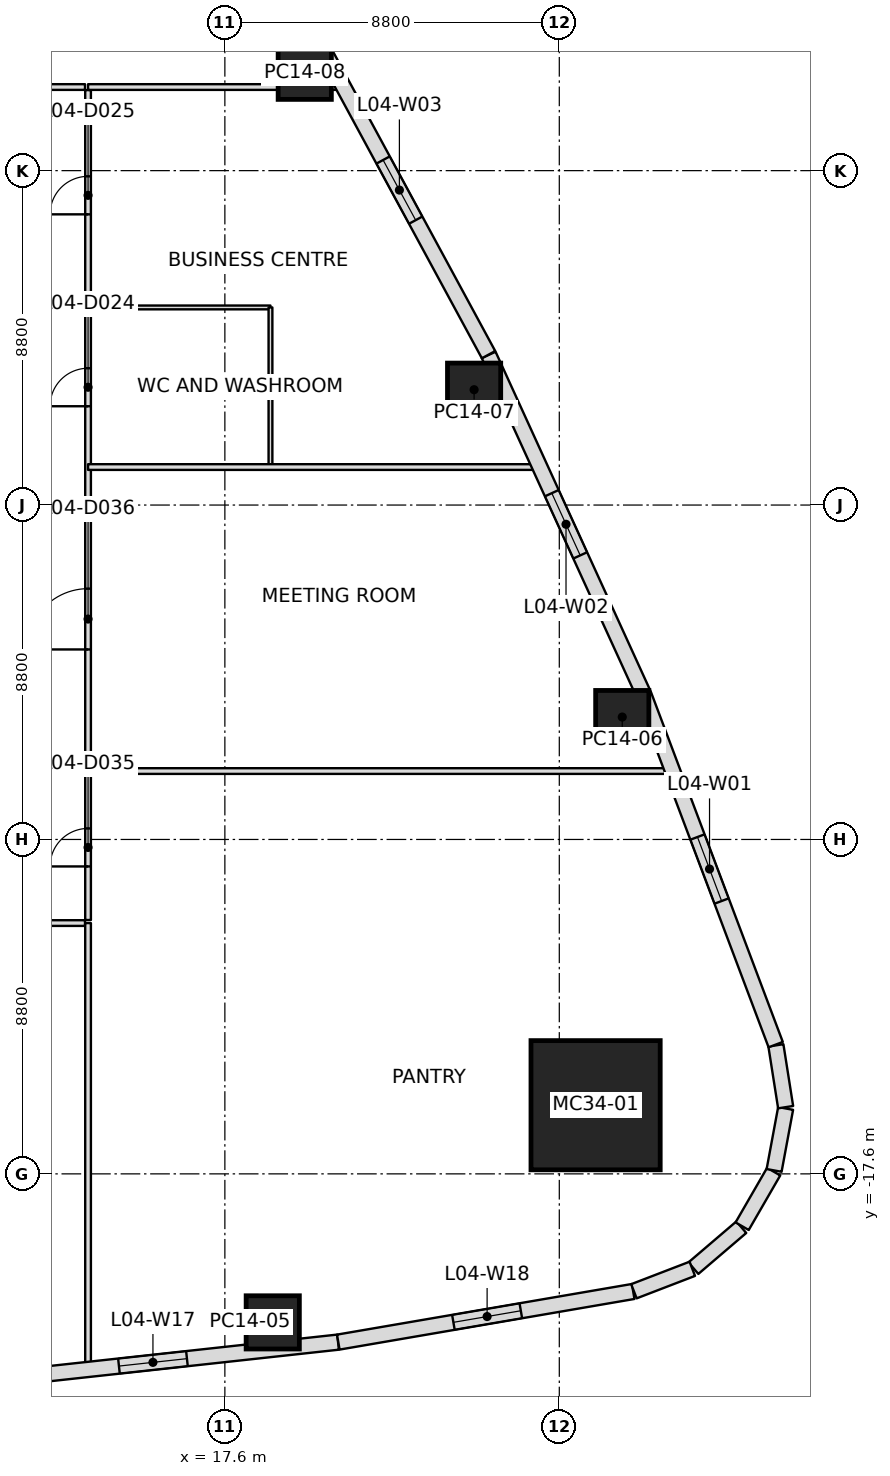
"""IFC4 building model, lengths in metres.
Left out: names, types, materials, properties, quantities, classifications, styles, units other than length and angle.
Written with IfcOpenShell. Run it as: python <this file> out.ifc"""

import sys

from ifc_helpers import new_model, si_unit, direction, frame, frame_2d, origin, origin_2d, place, context, subcontext, project, spatial, rectangle, extrude, clip, halfspace, element, fill, save


model = new_model("IFC4")
c1 = context("Model", 3, precision=1e-05, world=origin(), true_north=direction((0.0, 1.0)))
c2 = subcontext(c1, "Body", "Model", "MODEL_VIEW")
j1 = project(units=[si_unit("LENGTHUNIT", "METRE"), si_unit("PLANEANGLEUNIT", "RADIAN")], contexts=[c1])
p1 = place(None, origin())
s1 = spatial("IfcSite", under=j1, at=p1, CompositionType="ELEMENT")
p2 = place(p1, origin())
s2 = spatial("IfcBuilding", under=s1, at=p2, CompositionType="ELEMENT")
p3 = place(p2, frame((0.0, 0.0, 28.8)))
s3 = spatial("IfcBuildingStorey", under=s2, at=p3, CompositionType="ELEMENT", Elevation=28.8)
p4 = place(p3, frame((27.355, -15.793, 0.0), z_axis=(0.0, 0.0, 1.0), x_axis=(1.0, 0.0, 0.0)))
e1 = element("IfcColumn", 1, at=p4, inside=s3, PredefinedType="COLUMN", context=c2, shape_type="SweptSolid", body=[
    extrude(rectangle(XDim=3.4, YDim=3.4, at=origin_2d()), origin(), (0.0, 0.0, 1.0), 5.4),
])
p5 = place(p3, frame((18.86, -21.508, 0.0), z_axis=(0.0, 0.0, 1.0), x_axis=(0.991367231014, 0.131114504428, 0.0)))
e2 = element("IfcColumn", 2, at=p5, inside=s3, PredefinedType="COLUMN", context=c2, shape_type="SweptSolid", body=[
    extrude(rectangle(XDim=1.4, YDim=1.4, at=origin_2d()), origin(), (0.0, 0.0, 1.0), 5.4),
])
for number, where, z_axis, x_axis in (
    (3, (28.057, -5.579, 0.0), (0.0, 0.0, 1.0), (-0.382, 0.924, 0.0)),
    (4, (24.158, 3.035, 0.0), (0.0, 0.0, 1.0), (-0.442, 0.897, 0.0)),
    (5, (19.702, 11.375, 0.0), (0.0, 0.0, 1.0), (-0.5, 0.866, 0.0)),
):
    element("IfcColumn", number, at=place(p3, frame(where, z_axis=z_axis, x_axis=x_axis)), inside=s3, PredefinedType="COLUMN", context=c2, shape_type="SweptSolid", body=[
        clip(extrude(rectangle(XDim=1.4, YDim=1.4, at=origin_2d()), origin(), (0.0, 0.0, 1.0), 5.4), halfspace(frame((0.0, 0.0, 5.394)), False)),
    ])
for number, where, z_axis, x_axis in (
    (6, (31.19, -19.003, 0.0), (0.0, 0.0, 1.0), (-0.76, -0.65, 0.0)),
    (7, (32.041, -17.541, 0.0), (0.0, 0.0, 1.0), (-0.5, -0.866, 0.0)),
    (8, (32.355, -15.878, 0.0), (0.0, 0.0, 1.0), (-0.183, -0.983, 0.0)),
):
    element("IfcWall", number, at=place(p3, frame(where, z_axis=z_axis, x_axis=x_axis)), inside=s3, PredefinedType="STANDARD", context=c2, shape_type="SweptSolid", body=[
        extrude(rectangle(XDim=1.659, YDim=0.4, at=frame_2d((0.829, 0.0))), origin(), (0.0, 0.0, 1.0), 4.5),
    ])
p6 = place(p3, frame((32.099, -14.219, 0.0), z_axis=(0.0, 0.0, 1.0), x_axis=(0.155711266073, -0.98780261268, 0.0)))
e9 = element("IfcWall", 9, at=p6, inside=s3, PredefinedType="STANDARD", context=c2, shape_type="SweptSolid", body=[
    extrude(rectangle(XDim=1.646, YDim=0.4, at=frame_2d((0.823, 0.0))), origin(), (0.0, 0.0, 1.0), 4.5),
])
p7 = place(p3, frame((28.625, -4.993, 0.0), z_axis=(0.0, 0.0, 1.0), x_axis=(0.352569865932, -0.935785493389, 0.0)))
e10 = element("IfcWall", 10, at=p7, inside=s3, PredefinedType="STANDARD", context=c2, shape_type="SweptSolid", body=[
    extrude(rectangle(XDim=9.838, YDim=0.4, at=frame_2d((4.919, 0.0))), origin(), (0.0, 0.0, 1.0), 4.5),
])
p8 = place(p7, frame((4.0, 0.0, 0.9)))
e11 = element("IfcOpeningElement", 11, at=p8, cuts=e10, PredefinedType="OPENING", context=c2, shape_type="SweptSolid", body=[
    extrude(rectangle(XDim=1.8, YDim=1.5, at=frame_2d((0.9, 0.75))), frame((0.0, 0.2, 0.0), z_axis=(0.0, -1.0, 0.0), x_axis=(1.0, 0.0, 0.0)), (0.0, 0.0, 1.0), 0.4),
])
p9 = place(p3, frame((24.541, 3.951, 0.0), z_axis=(0.0, 0.0, 1.0), x_axis=(0.415399179946, -0.909639225902, 0.0)))
e12 = element("IfcWall", 12, at=p9, inside=s3, PredefinedType="STANDARD", context=c2, shape_type="SweptSolid", body=[
    extrude(rectangle(XDim=9.826, YDim=0.4, at=frame_2d((4.913, 0.0))), origin(), (0.0, 0.0, 1.0), 4.5),
])
p10 = place(p9, frame((4.0, 0.0, 0.9)))
e13 = element("IfcOpeningElement", 13, at=p10, cuts=e12, PredefinedType="OPENING", context=c2, shape_type="SweptSolid", body=[
    extrude(rectangle(XDim=1.8, YDim=1.5, at=frame_2d((0.9, 0.75))), frame((0.0, 0.2, 0.0), z_axis=(0.0, -1.0, 0.0), x_axis=(1.0, 0.0, 0.0)), (0.0, 0.0, 1.0), 0.4),
])
p11 = place(p3, frame((19.859, 12.597, 0.0), z_axis=(0.0, 0.0, 1.0), x_axis=(0.476254331716, -0.879307575039, 0.0)))
e14 = element("IfcWall", 14, at=p11, inside=s3, PredefinedType="STANDARD", context=c2, shape_type="SweptSolid", body=[
    extrude(rectangle(XDim=9.825, YDim=0.4, at=frame_2d((4.913, 0.0))), origin(), (0.0, 0.0, 1.0), 4.5),
])
p12 = place(p11, frame((4.0, 0.0, 0.9)))
e15 = element("IfcOpeningElement", 15, at=p12, cuts=e14, PredefinedType="OPENING", context=c2, shape_type="SweptSolid", body=[
    extrude(rectangle(XDim=1.8, YDim=1.5, at=frame_2d((0.9, 0.75))), frame((0.0, 0.2, 0.0), z_axis=(0.0, -1.0, 0.0), x_axis=(1.0, 0.0, 0.0)), (0.0, 0.0, 1.0), 0.4),
])
p13 = place(p3, frame((20.579, -22.028, 0.0), z_axis=(0.0, 0.0, 1.0), x_axis=(-0.994084776508, -0.108606892574, 0.0)))
e16 = element("IfcWall", 16, at=p13, inside=s3, PredefinedType="STANDARD", context=c2, shape_type="SweptSolid", body=[
    extrude(rectangle(XDim=9.826, YDim=0.4, at=frame_2d((4.913, 0.0))), origin(), (0.0, 0.0, 1.0), 4.5),
])
p14 = place(p13, frame((4.0, 0.0, 0.9)))
e17 = element("IfcOpeningElement", 17, at=p14, cuts=e16, PredefinedType="OPENING", context=c2, shape_type="SweptSolid", body=[
    extrude(rectangle(XDim=1.8, YDim=1.5, at=frame_2d((0.9, 0.75))), frame((0.0, 0.2, 0.0), z_axis=(0.0, -1.0, 0.0), x_axis=(1.0, 0.0, 0.0)), (0.0, 0.0, 1.0), 0.4),
])
p15 = place(p3, frame((28.344, -20.695, 0.0), z_axis=(0.0, 0.0, 1.0), x_axis=(-0.985573227811, -0.169249557228, 0.0)))
e18 = element("IfcWall", 18, at=p15, inside=s3, PredefinedType="STANDARD", context=c2, shape_type="SweptSolid", body=[
    extrude(rectangle(XDim=7.873, YDim=0.4, at=frame_2d((3.937, 0.0))), origin(), (0.0, 0.0, 1.0), 4.5),
])
p16 = place(p15, frame((3.0, 0.0, 0.9)))
e19 = element("IfcOpeningElement", 19, at=p16, cuts=e18, PredefinedType="OPENING", context=c2, shape_type="SweptSolid", body=[
    extrude(rectangle(XDim=1.8, YDim=1.5, at=frame_2d((0.9, 0.75))), frame((0.0, 0.2, 0.0), z_axis=(0.0, -1.0, 0.0), x_axis=(1.0, 0.0, 0.0)), (0.0, 0.0, 1.0), 0.4),
])
p17 = place(p3, frame((29.9, -20.098, 0.0), z_axis=(0.0, 0.0, 1.0), x_axis=(-0.933315023429, -0.359058584415, 0.0)))
e20 = element("IfcWall", 20, at=p17, inside=s3, PredefinedType="STANDARD", context=c2, shape_type="SweptSolid", body=[
    extrude(rectangle(XDim=1.646, YDim=0.4, at=frame_2d((0.823, 0.0))), origin(), (0.0, 0.0, 1.0), 4.5),
])
p18 = place(p3, frame((14.0, -11.0, 0.0), z_axis=(0.0, 0.0, 1.0), x_axis=(0.0, -1.0, 0.0)))
e21 = element("IfcWall", 21, at=p18, inside=s3, PredefinedType="PARTITIONING", context=c2, shape_type="SweptSolid", body=[
    extrude(rectangle(XDim=11.697, YDim=0.15, at=frame_2d((5.849, 0.0))), origin(), (0.0, 0.0, 1.0), 4.384),
])
p19 = place(p3, frame((14.0, -7.0, 0.0), z_axis=(0.0, 0.0, 1.0), x_axis=(1.0, 0.0, 0.0)))
e22 = element("IfcWall", 22, at=p19, inside=s3, PredefinedType="PARTITIONING", context=c2, shape_type="SweptSolid", body=[
    extrude(rectangle(XDim=15.313, YDim=0.15, at=frame_2d((7.656, 0.0))), origin(), (0.0, 0.0, 1.0), 4.384),
])
p20 = place(p3, frame((25.835, 1.0, 0.0), z_axis=(0.0, 0.0, 1.0), x_axis=(-1.0, 0.0, 0.0)))
e23 = element("IfcWall", 23, at=p20, inside=s3, PredefinedType="PARTITIONING", context=c2, shape_type="SweptSolid", body=[
    extrude(rectangle(XDim=11.835, YDim=0.15, at=frame_2d((5.917, 0.0))), origin(), (0.0, 0.0, 1.0), 4.384),
])
p21 = place(p3, frame((14.0, 11.0, 0.0), z_axis=(0.0, 0.0, 1.0), x_axis=(1.0, 0.0, 0.0)))
e24 = element("IfcWall", 24, at=p21, inside=s3, PredefinedType="PARTITIONING", context=c2, shape_type="SweptSolid", body=[
    extrude(rectangle(XDim=6.642, YDim=0.15, at=frame_2d((3.321, 0.0))), origin(), (0.0, 0.0, 1.0), 4.6),
])
p22 = place(p3, frame((-13.92, -11.0, 0.0), z_axis=(0.0, 0.0, 1.0), x_axis=(1.0, 0.0, 0.0)))
e25 = element("IfcWall", 25, at=p22, inside=s3, PredefinedType="PARTITIONING", context=c2, shape_type="SweptSolid", body=[
    extrude(rectangle(XDim=27.84, YDim=0.15, at=frame_2d((13.92, 0.0))), origin(), (0.0, 0.0, 1.0), 4.397),
])
p23 = place(p22, frame((4.42, 0.0, 0.0)))
e26 = element("IfcOpeningElement", 26, at=p23, cuts=e25, PredefinedType="OPENING", context=c2, shape_type="SweptSolid", body=[
    extrude(rectangle(XDim=1.0, YDim=2.1, at=frame_2d((0.5, 1.05))), frame((0.0, 0.075, 0.0), z_axis=(0.0, -1.0, 0.0), x_axis=(1.0, 0.0, 0.0)), (0.0, 0.0, 1.0), 0.15),
])
p24 = place(p22, frame((11.52, 0.0, 0.0)))
e27 = element("IfcOpeningElement", 27, at=p24, cuts=e25, PredefinedType="OPENING", context=c2, shape_type="SweptSolid", body=[
    extrude(rectangle(XDim=1.0, YDim=2.1, at=frame_2d((0.5, 1.05))), frame((0.0, 0.075, 0.0), z_axis=(0.0, -1.0, 0.0), x_axis=(1.0, 0.0, 0.0)), (0.0, 0.0, 1.0), 0.15),
])
p25 = place(p22, frame((15.57, 0.0, 0.0)))
e28 = element("IfcOpeningElement", 28, at=p25, cuts=e25, PredefinedType="OPENING", context=c2, shape_type="SweptSolid", body=[
    extrude(rectangle(XDim=1.0, YDim=2.1, at=frame_2d((0.5, 1.05))), frame((0.0, 0.075, 0.0), z_axis=(0.0, -1.0, 0.0), x_axis=(1.0, 0.0, 0.0)), (0.0, 0.0, 1.0), 0.15),
])
p26 = place(p22, frame((22.02, 0.0, 0.0)))
e29 = element("IfcOpeningElement", 29, at=p26, cuts=e25, PredefinedType="OPENING", context=c2, shape_type="SweptSolid", body=[
    extrude(rectangle(XDim=1.8, YDim=2.1, at=frame_2d((0.9, 1.05))), frame((0.0, 0.075, 0.0), z_axis=(0.0, -1.0, 0.0), x_axis=(1.0, 0.0, 0.0)), (0.0, 0.0, 1.0), 0.15),
])
p27 = place(p3, frame((13.92, 11.0, 0.0), z_axis=(0.0, 0.0, 1.0), x_axis=(-1.0, 0.0, 0.0)))
e30 = element("IfcWall", 30, at=p27, inside=s3, PredefinedType="PARTITIONING", context=c2, shape_type="SweptSolid", body=[
    extrude(rectangle(XDim=27.84, YDim=0.15, at=frame_2d((13.92, 0.0))), origin(), (0.0, 0.0, 1.0), 4.097),
])
p28 = place(p27, frame((4.11, 0.0, 0.0)))
e31 = element("IfcOpeningElement", 31, at=p28, cuts=e30, PredefinedType="OPENING", context=c2, shape_type="SweptSolid", body=[
    extrude(rectangle(XDim=1.6, YDim=2.1, at=frame_2d((0.8, 1.05))), frame((0.0, 0.075, 0.0), z_axis=(0.0, -1.0, 0.0), x_axis=(1.0, 0.0, 0.0)), (0.0, 0.0, 1.0), 0.15),
])
p29 = place(p27, frame((13.02, 0.0, 0.0)))
e32 = element("IfcOpeningElement", 32, at=p29, cuts=e30, PredefinedType="OPENING", context=c2, shape_type="SweptSolid", body=[
    extrude(rectangle(XDim=1.8, YDim=2.1, at=frame_2d((0.9, 1.05))), frame((0.0, 0.075, 0.0), z_axis=(0.0, -1.0, 0.0), x_axis=(1.0, 0.0, 0.0)), (0.0, 0.0, 1.0), 0.15),
])
p30 = place(p27, frame((22.43, 0.0, 0.0)))
e33 = element("IfcOpeningElement", 33, at=p30, cuts=e30, PredefinedType="OPENING", context=c2, shape_type="SweptSolid", body=[
    extrude(rectangle(XDim=1.0, YDim=2.1, at=frame_2d((0.5, 1.05))), frame((0.0, 0.075, 0.0), z_axis=(0.0, -1.0, 0.0), x_axis=(1.0, 0.0, 0.0)), (0.0, 0.0, 1.0), 0.15),
])
p31 = place(p3, frame((14.0, -10.92, 0.0), z_axis=(0.0, 0.0, 1.0), x_axis=(0.0, 1.0, 0.0)))
e34 = element("IfcWall", 34, at=p31, inside=s3, PredefinedType="PARTITIONING", context=c2, shape_type="SweptSolid", body=[
    extrude(rectangle(XDim=21.84, YDim=0.15, at=frame_2d((10.92, 0.0))), origin(), (0.0, 0.0, 1.0), 4.097),
])
p32 = place(p31, frame((13.52, 0.0, 0.0)))
e35 = element("IfcOpeningElement", 35, at=p32, cuts=e34, PredefinedType="OPENING", context=c2, shape_type="SweptSolid", body=[
    extrude(rectangle(XDim=1.0, YDim=2.1, at=frame_2d((0.5, 1.05))), frame((0.0, 0.075, 0.0), z_axis=(0.0, -1.0, 0.0), x_axis=(1.0, 0.0, 0.0)), (0.0, 0.0, 1.0), 0.15),
])
p33 = place(p31, frame((18.57, 0.0, 0.0)))
e36 = element("IfcOpeningElement", 36, at=p33, cuts=e34, PredefinedType="OPENING", context=c2, shape_type="SweptSolid", body=[
    extrude(rectangle(XDim=1.0, YDim=2.1, at=frame_2d((0.5, 1.05))), frame((0.0, 0.075, 0.0), z_axis=(0.0, -1.0, 0.0), x_axis=(1.0, 0.0, 0.0)), (0.0, 0.0, 1.0), 0.15),
])
p34 = place(p31, frame((1.41, 0.0, 0.0)))
e37 = element("IfcOpeningElement", 37, at=p34, cuts=e34, PredefinedType="OPENING", context=c2, shape_type="SweptSolid", body=[
    extrude(rectangle(XDim=1.0, YDim=2.1, at=frame_2d((0.5, 1.05))), frame((0.0, 0.075, 0.0), z_axis=(0.0, -1.0, 0.0), x_axis=(1.0, 0.0, 0.0)), (0.0, 0.0, 1.0), 0.15),
])
p35 = place(p31, frame((7.12, 0.0, 0.0)))
e38 = element("IfcOpeningElement", 38, at=p35, cuts=e34, PredefinedType="OPENING", context=c2, shape_type="SweptSolid", body=[
    extrude(rectangle(XDim=1.6, YDim=2.1, at=frame_2d((0.8, 1.05))), frame((0.0, 0.075, 0.0), z_axis=(0.0, -1.0, 0.0), x_axis=(1.0, 0.0, 0.0)), (0.0, 0.0, 1.0), 0.15),
])
p36 = place(p3, frame((14.03, 5.2, 0.0), z_axis=(0.0, 0.0, 1.0), x_axis=(1.0, 0.0, 0.0)))
e39 = element("IfcWall", 39, at=p36, inside=s3, PredefinedType="PARTITIONING", context=c2, shape_type="SweptSolid", body=[
    extrude(rectangle(XDim=4.77, YDim=0.1, at=frame_2d((2.385, 0.0))), origin(), (0.0, 0.0, 1.0), 4.543),
])
p37 = place(p3, frame((18.8, 5.2, 0.0), z_axis=(0.0, 0.0, 1.0), x_axis=(0.0, -1.0, 0.0)))
e40 = element("IfcWall", 40, at=p37, inside=s3, PredefinedType="PARTITIONING", context=c2, shape_type="SweptSolid", body=[
    extrude(rectangle(XDim=4.17, YDim=0.1, at=frame_2d((2.085, 0.0))), origin(), (0.0, 0.0, 1.0), 4.467),
])
p38 = place(p8, origin())
e41 = element("IfcWindow", 41, at=p38, inside=s3, PartitioningType="SINGLE_PANEL", PredefinedType="WINDOW", context=c2, shape_type="SweptSolid", body=[
    extrude(rectangle(XDim=1.8, YDim=1.5, at=frame_2d((0.9, 0.75))), frame((0.0, 0.03, 0.0), z_axis=(0.0, -1.0, 0.0), x_axis=(1.0, 0.0, 0.0)), (0.0, 0.0, 1.0), 0.06),
])
fill(e11, e41)
p39 = place(p10, origin())
e42 = element("IfcWindow", 42, at=p39, inside=s3, PartitioningType="SINGLE_PANEL", PredefinedType="WINDOW", context=c2, shape_type="SweptSolid", body=[
    extrude(rectangle(XDim=1.8, YDim=1.5, at=frame_2d((0.9, 0.75))), frame((0.0, 0.03, 0.0), z_axis=(0.0, -1.0, 0.0), x_axis=(1.0, 0.0, 0.0)), (0.0, 0.0, 1.0), 0.06),
])
fill(e13, e42)
p40 = place(p12, origin())
e43 = element("IfcWindow", 43, at=p40, inside=s3, PartitioningType="SINGLE_PANEL", PredefinedType="WINDOW", context=c2, shape_type="SweptSolid", body=[
    extrude(rectangle(XDim=1.8, YDim=1.5, at=frame_2d((0.9, 0.75))), frame((0.0, 0.03, 0.0), z_axis=(0.0, -1.0, 0.0), x_axis=(1.0, 0.0, 0.0)), (0.0, 0.0, 1.0), 0.06),
])
fill(e15, e43)
p41 = place(p14, origin())
e44 = element("IfcWindow", 44, at=p41, inside=s3, PartitioningType="SINGLE_PANEL", PredefinedType="WINDOW", context=c2, shape_type="SweptSolid", body=[
    extrude(rectangle(XDim=1.8, YDim=1.5, at=frame_2d((0.9, 0.75))), frame((0.0, 0.03, 0.0), z_axis=(0.0, -1.0, 0.0), x_axis=(1.0, 0.0, 0.0)), (0.0, 0.0, 1.0), 0.06),
])
fill(e17, e44)
p42 = place(p16, origin())
e45 = element("IfcWindow", 45, at=p42, inside=s3, PartitioningType="SINGLE_PANEL", PredefinedType="WINDOW", context=c2, shape_type="SweptSolid", body=[
    extrude(rectangle(XDim=1.8, YDim=1.5, at=frame_2d((0.9, 0.75))), frame((0.0, 0.03, 0.0), z_axis=(0.0, -1.0, 0.0), x_axis=(1.0, 0.0, 0.0)), (0.0, 0.0, 1.0), 0.06),
])
fill(e19, e45)
p43 = place(p32, origin())
e46 = element("IfcDoor", 46, at=p43, inside=s3, OperationType="SINGLE_SWING_RIGHT", PredefinedType="DOOR", context=c2, shape_type="SweptSolid", body=[
    extrude(rectangle(XDim=1.0, YDim=2.1, at=frame_2d((0.5, 1.05))), frame((0.0, 0.025, 0.0), z_axis=(0.0, -1.0, 0.0), x_axis=(1.0, 0.0, 0.0)), (0.0, 0.0, 1.0), 0.05),
])
fill(e35, e46)
p44 = place(p33, origin())
e47 = element("IfcDoor", 47, at=p44, inside=s3, OperationType="SINGLE_SWING_RIGHT", PredefinedType="DOOR", context=c2, shape_type="SweptSolid", body=[
    extrude(rectangle(XDim=1.0, YDim=2.1, at=frame_2d((0.5, 1.05))), frame((0.0, 0.025, 0.0), z_axis=(0.0, -1.0, 0.0), x_axis=(1.0, 0.0, 0.0)), (0.0, 0.0, 1.0), 0.05),
])
fill(e36, e47)
p45 = place(p34, origin())
e48 = element("IfcDoor", 48, at=p45, inside=s3, OperationType="SINGLE_SWING_LEFT", PredefinedType="DOOR", context=c2, shape_type="SweptSolid", body=[
    extrude(rectangle(XDim=1.0, YDim=2.1, at=frame_2d((0.5, 1.05))), frame((0.0, 0.025, 0.0), z_axis=(0.0, -1.0, 0.0), x_axis=(1.0, 0.0, 0.0)), (0.0, 0.0, 1.0), 0.05),
])
fill(e37, e48)
p46 = place(p35, origin())
e49 = element("IfcDoor", 49, at=p46, inside=s3, OperationType="DOUBLE_DOOR_SINGLE_SWING", PredefinedType="DOOR", context=c2, shape_type="SweptSolid", body=[
    extrude(rectangle(XDim=1.6, YDim=2.1, at=frame_2d((0.8, 1.05))), frame((0.0, 0.025, 0.0), z_axis=(0.0, -1.0, 0.0), x_axis=(1.0, 0.0, 0.0)), (0.0, 0.0, 1.0), 0.05),
])
fill(e38, e49)
save(model, sys.argv[1])
